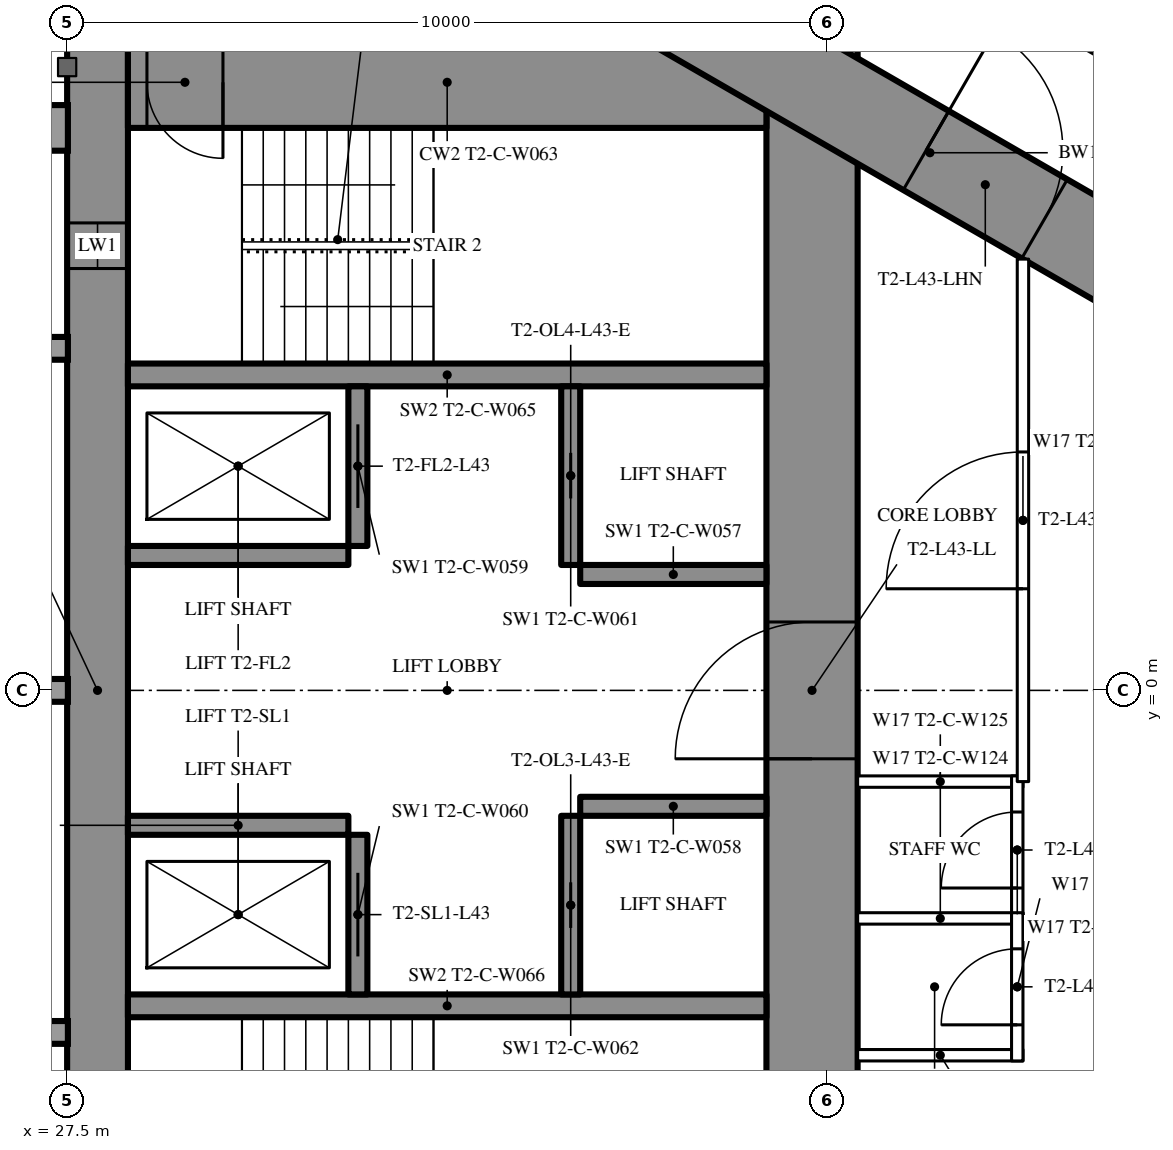
"""IFC4 building model, lengths in metres.
Left out: names, types, materials, properties, quantities, classifications, styles, units other than length and angle.
Written with IfcOpenShell. Run it as: python <this file> out.ifc"""

import sys

from ifc_helpers import new_model, si_unit, direction, frame, frame_2d, origin, place, context, subcontext, project, spatial, rectangle, extrude, element, fill, save


model = new_model("IFC4")
c1 = context("Model", 3, precision=1e-05, world=origin(), true_north=direction((0.0, 1.0)))
c2 = subcontext(c1, "Body", "Model", "MODEL_VIEW")
j1 = project(units=[si_unit("LENGTHUNIT", "METRE"), si_unit("PLANEANGLEUNIT", "RADIAN")], contexts=[c1])
p1 = place(None, origin())
s1 = spatial("IfcSite", under=j1, at=p1, CompositionType="ELEMENT")
p2 = place(p1, origin())
s2 = spatial("IfcBuilding", under=s1, at=p2, CompositionType="ELEMENT")
p3 = place(p2, frame((0.0, 0.0, 163.3)))
s3 = spatial("IfcBuildingStorey", under=s2, at=p3, CompositionType="ELEMENT", Elevation=163.3)
p4 = place(p3, frame((27.9, -8.6, 0.0), z_axis=(0.0, 0.0, 1.0), x_axis=(0.0, 1.0, 0.0)))
e1 = element("IfcWall", 1, at=p4, inside=s3, PredefinedType="SHEAR", context=c2, shape_type="SweptSolid", body=[
    extrude(rectangle(XDim=17.2, YDim=0.8, at=frame_2d((8.6, 0.0))), origin(), (0.0, 0.0, 1.0), 3.5),
])
p5 = place(p4, frame((2.45, 0.0, 0.6)))
e2 = element("IfcOpeningElement", 2, at=p5, cuts=e1, PredefinedType="OPENING", context=c2, shape_type="SweptSolid", body=[
    extrude(rectangle(XDim=0.6, YDim=2.1, at=frame_2d((0.3, 1.05))), frame((0.0, 0.41, 0.0), z_axis=(0.0, -1.0, 0.0), x_axis=(1.0, 0.0, 0.0)), (0.0, 0.0, 1.0), 0.82),
])
p6 = place(p4, frame((14.15, 0.0, 0.6)))
e3 = element("IfcOpeningElement", 3, at=p6, cuts=e1, PredefinedType="OPENING", context=c2, shape_type="SweptSolid", body=[
    extrude(rectangle(XDim=0.6, YDim=2.1, at=frame_2d((0.3, 1.05))), frame((0.0, 0.41, 0.0), z_axis=(0.0, -1.0, 0.0), x_axis=(1.0, 0.0, 0.0)), (0.0, 0.0, 1.0), 0.82),
])
p7 = place(p3, frame((37.3, -8.6, 0.0), z_axis=(0.0, 0.0, 1.0), x_axis=(0.0, 1.0, 0.0)))
e4 = element("IfcWall", 4, at=p7, inside=s3, PredefinedType="SHEAR", context=c2, shape_type="SweptSolid", body=[
    extrude(rectangle(XDim=17.2, YDim=1.2, at=frame_2d((8.6, 0.0))), origin(), (0.0, 0.0, 1.0), 3.5),
])
p8 = place(p7, frame((7.7, 0.0, 0.0)))
e5 = element("IfcOpeningElement", 5, at=p8, cuts=e4, PredefinedType="OPENING", context=c2, shape_type="SweptSolid", body=[
    extrude(rectangle(XDim=1.8, YDim=2.2, at=frame_2d((0.9, 1.1))), frame((0.0, 0.61, 0.0), z_axis=(0.0, -1.0, 0.0), x_axis=(1.0, 0.0, 0.0)), (0.0, 0.0, 1.0), 1.22),
])
p9 = place(p3, frame((28.3, 8.0, 0.0), z_axis=(0.0, 0.0, 1.0), x_axis=(1.0, 0.0, 0.0)))
e6 = element("IfcWall", 6, at=p9, inside=s3, PredefinedType="SHEAR", context=c2, shape_type="SweptSolid", body=[
    extrude(rectangle(XDim=8.4, YDim=1.2, at=frame_2d((4.2, 0.0))), origin(), (0.0, 0.0, 1.0), 3.5),
])
p10 = place(p9, frame((0.25, 0.0, 0.0)))
e7 = element("IfcOpeningElement", 7, at=p10, cuts=e6, PredefinedType="OPENING", context=c2, shape_type="SweptSolid", body=[
    extrude(rectangle(XDim=1.0, YDim=2.2, at=frame_2d((0.5, 1.1))), frame((0.0, 0.61, 0.0), z_axis=(0.0, -1.0, 0.0), x_axis=(1.0, 0.0, 0.0)), (0.0, 0.0, 1.0), 1.22),
])
for number, where, z_axis, x_axis in (
    (8, (28.3, -4.15, 0.0), (0.0, 0.0, 1.0), (1.0, 0.0, 0.0)),
    (9, (28.3, 4.15, 0.0), (0.0, 0.0, 1.0), (1.0, 0.0, 0.0)),
):
    element("IfcWall", number, at=place(p3, frame(where, z_axis=z_axis, x_axis=x_axis)), inside=s3, PredefinedType="SHEAR", context=c2, shape_type="SweptSolid", body=[
        extrude(rectangle(XDim=8.4, YDim=0.3, at=frame_2d((4.2, 0.0))), origin(), (0.0, 0.0, 1.0), 3.5),
    ])
p11 = place(p3, frame((31.325, -4.0, 0.0), z_axis=(0.0, 0.0, 1.0), x_axis=(0.0, 1.0, 0.0)))
e10 = element("IfcWall", 10, at=p11, inside=s3, PredefinedType="SHEAR", context=c2, shape_type="SweptSolid", body=[
    extrude(rectangle(XDim=2.1, YDim=0.25, at=frame_2d((1.05, 0.0))), origin(), (0.0, 0.0, 1.0), 3.5),
])
p12 = place(p11, frame((0.5, 0.0, 0.0)))
e11 = element("IfcOpeningElement", 11, at=p12, cuts=e10, PredefinedType="OPENING", context=c2, shape_type="SweptSolid", body=[
    extrude(rectangle(XDim=1.1, YDim=2.2, at=frame_2d((0.55, 1.1))), frame((0.0, 0.135, 0.0), z_axis=(0.0, -1.0, 0.0), x_axis=(1.0, 0.0, 0.0)), (0.0, 0.0, 1.0), 0.27),
])
p13 = place(p3, frame((34.125, -4.0, 0.0), z_axis=(0.0, 0.0, 1.0), x_axis=(0.0, 1.0, 0.0)))
e12 = element("IfcWall", 12, at=p13, inside=s3, PredefinedType="SHEAR", context=c2, shape_type="SweptSolid", body=[
    extrude(rectangle(XDim=2.35, YDim=0.25, at=frame_2d((1.175, 0.0))), origin(), (0.0, 0.0, 1.0), 3.5),
])
p14 = place(p13, frame((0.875, 0.0, 0.0)))
e13 = element("IfcOpeningElement", 13, at=p14, cuts=e12, PredefinedType="OPENING", context=c2, shape_type="SweptSolid", body=[
    extrude(rectangle(XDim=0.6, YDim=2.0, at=frame_2d((0.3, 1.0))), frame((0.0, 0.135, 0.0), z_axis=(0.0, -1.0, 0.0), x_axis=(1.0, 0.0, 0.0)), (0.0, 0.0, 1.0), 0.27),
])
p15 = place(p3, frame((28.3, -1.775, 0.0), z_axis=(0.0, 0.0, 1.0), x_axis=(1.0, 0.0, 0.0)))
e14 = element("IfcWall", 14, at=p15, inside=s3, PredefinedType="SHEAR", context=c2, shape_type="SweptSolid", body=[
    extrude(rectangle(XDim=2.9, YDim=0.25, at=frame_2d((1.45, 0.0))), origin(), (0.0, 0.0, 1.0), 3.5),
])
p16 = place(p3, frame((34.25, -1.525, 0.0), z_axis=(0.0, 0.0, 1.0), x_axis=(1.0, 0.0, 0.0)))
e15 = element("IfcWall", 15, at=p16, inside=s3, PredefinedType="SHEAR", context=c2, shape_type="SweptSolid", body=[
    extrude(rectangle(XDim=2.45, YDim=0.25, at=frame_2d((1.225, 0.0))), origin(), (0.0, 0.0, 1.0), 3.5),
])
p17 = place(p3, frame((31.325, 1.9, 0.0), z_axis=(0.0, 0.0, 1.0), x_axis=(0.0, 1.0, 0.0)))
e16 = element("IfcWall", 16, at=p17, inside=s3, PredefinedType="SHEAR", context=c2, shape_type="SweptSolid", body=[
    extrude(rectangle(XDim=2.1, YDim=0.25, at=frame_2d((1.05, 0.0))), origin(), (0.0, 0.0, 1.0), 3.5),
])
p18 = place(p17, frame((0.5, 0.0, 0.0)))
e17 = element("IfcOpeningElement", 17, at=p18, cuts=e16, PredefinedType="OPENING", context=c2, shape_type="SweptSolid", body=[
    extrude(rectangle(XDim=1.1, YDim=2.2, at=frame_2d((0.55, 1.1))), frame((0.0, 0.135, 0.0), z_axis=(0.0, -1.0, 0.0), x_axis=(1.0, 0.0, 0.0)), (0.0, 0.0, 1.0), 0.27),
])
p19 = place(p3, frame((34.125, 1.65, 0.0), z_axis=(0.0, 0.0, 1.0), x_axis=(0.0, 1.0, 0.0)))
e18 = element("IfcWall", 18, at=p19, inside=s3, PredefinedType="SHEAR", context=c2, shape_type="SweptSolid", body=[
    extrude(rectangle(XDim=2.35, YDim=0.25, at=frame_2d((1.175, 0.0))), origin(), (0.0, 0.0, 1.0), 3.5),
])
p20 = place(p19, frame((0.875, 0.0, 0.0)))
e19 = element("IfcOpeningElement", 19, at=p20, cuts=e18, PredefinedType="OPENING", context=c2, shape_type="SweptSolid", body=[
    extrude(rectangle(XDim=0.6, YDim=2.0, at=frame_2d((0.3, 1.0))), frame((0.0, 0.135, 0.0), z_axis=(0.0, -1.0, 0.0), x_axis=(1.0, 0.0, 0.0)), (0.0, 0.0, 1.0), 0.27),
])
p21 = place(p3, frame((28.3, 1.775, 0.0), z_axis=(0.0, 0.0, 1.0), x_axis=(1.0, 0.0, 0.0)))
e20 = element("IfcWall", 20, at=p21, inside=s3, PredefinedType="SHEAR", context=c2, shape_type="SweptSolid", body=[
    extrude(rectangle(XDim=2.9, YDim=0.25, at=frame_2d((1.45, 0.0))), origin(), (0.0, 0.0, 1.0), 3.5),
])
p22 = place(p3, frame((34.25, 1.525, 0.0), z_axis=(0.0, 0.0, 1.0), x_axis=(1.0, 0.0, 0.0)))
e21 = element("IfcWall", 21, at=p22, inside=s3, PredefinedType="SHEAR", context=c2, shape_type="SweptSolid", body=[
    extrude(rectangle(XDim=2.45, YDim=0.25, at=frame_2d((1.225, 0.0))), origin(), (0.0, 0.0, 1.0), 3.5),
])
p23 = place(p3, frame((27.2, -13.8, 0.0), z_axis=(0.0, 0.0, 1.0), x_axis=(0.866027159892, 0.499996958321, 0.0)))
e22 = element("IfcWall", 22, at=p23, inside=s3, PredefinedType="SHEAR", context=c2, shape_type="SweptSolid", body=[
    extrude(rectangle(XDim=27.947, YDim=1.2, at=frame_2d((13.973, 0.0))), origin(), (0.0, 0.0, 1.0), 3.5),
])
p24 = place(p23, frame((4.6, 0.0, 0.0)))
e23 = element("IfcOpeningElement", 23, at=p24, cuts=e22, PredefinedType="OPENING", context=c2, shape_type="SweptSolid", body=[
    extrude(rectangle(XDim=1.0, YDim=2.2, at=frame_2d((0.5, 1.1))), frame((0.0, 0.61, 0.0), z_axis=(0.0, -1.0, 0.0), x_axis=(1.0, 0.0, 0.0)), (0.0, 0.0, 1.0), 1.22),
])
p25 = place(p23, frame((13.395, 0.0, 0.0)))
e24 = element("IfcOpeningElement", 24, at=p25, cuts=e22, PredefinedType="OPENING", context=c2, shape_type="SweptSolid", body=[
    extrude(rectangle(XDim=1.8, YDim=2.2, at=frame_2d((0.9, 1.1))), frame((0.0, 0.61, 0.0), z_axis=(0.0, -1.0, 0.0), x_axis=(1.0, 0.0, 0.0)), (0.0, 0.0, 1.0), 1.22),
])
p26 = place(p3, frame((27.2, 13.8, 0.0), z_axis=(0.0, 0.0, 1.0), x_axis=(0.866024515034, -0.500001539357, 0.0)))
e25 = element("IfcWall", 25, at=p26, inside=s3, PredefinedType="SHEAR", context=c2, shape_type="SweptSolid", body=[
    extrude(rectangle(XDim=26.907, YDim=1.2, at=frame_2d((13.454, 0.0))), origin(), (0.0, 0.0, 1.0), 3.5),
])
p27 = place(p26, frame((4.6, 0.0, 0.0)))
e26 = element("IfcOpeningElement", 26, at=p27, cuts=e25, PredefinedType="OPENING", context=c2, shape_type="SweptSolid", body=[
    extrude(rectangle(XDim=1.0, YDim=2.2, at=frame_2d((0.5, 1.1))), frame((0.0, 0.61, 0.0), z_axis=(0.0, -1.0, 0.0), x_axis=(1.0, 0.0, 0.0)), (0.0, 0.0, 1.0), 1.22),
])
p28 = place(p26, frame((13.395, 0.0, 0.0)))
e27 = element("IfcOpeningElement", 27, at=p28, cuts=e25, PredefinedType="OPENING", context=c2, shape_type="SweptSolid", body=[
    extrude(rectangle(XDim=1.8, YDim=2.2, at=frame_2d((0.9, 1.1))), frame((0.0, 0.61, 0.0), z_axis=(0.0, -1.0, 0.0), x_axis=(1.0, 0.0, 0.0)), (0.0, 0.0, 1.0), 1.22),
])
p29 = place(p3, frame((27.959, 16.017, 0.0), z_axis=(0.0, 0.0, 1.0), x_axis=(0.866027146794, -0.499996981007, 0.0)))
e28 = element("IfcWall", 28, at=p29, inside=s3, PredefinedType="PARTITIONING", context=c2, shape_type="SweptSolid", body=[
    extrude(rectangle(XDim=21.657, YDim=0.2, at=frame_2d((10.829, 0.0))), origin(), (0.0, 0.0, 1.0), 3.25),
])
p30 = place(p29, frame((15.391, 0.0, 0.0)))
e29 = element("IfcOpeningElement", 29, at=p30, cuts=e28, PredefinedType="OPENING", context=c2, shape_type="SweptSolid", body=[
    extrude(rectangle(XDim=0.95, YDim=2.2, at=frame_2d((0.475, 1.1))), frame((0.0, 0.11, 0.0), z_axis=(0.0, -1.0, 0.0), x_axis=(1.0, 0.0, 0.0)), (0.0, 0.0, 1.0), 0.22),
])
p31 = place(p29, frame((13.409, 0.0, 0.0)))
e30 = element("IfcOpeningElement", 30, at=p31, cuts=e28, PredefinedType="OPENING", context=c2, shape_type="SweptSolid", body=[
    extrude(rectangle(XDim=0.95, YDim=2.2, at=frame_2d((0.475, 1.1))), frame((0.0, 0.11, 0.0), z_axis=(0.0, -1.0, 0.0), x_axis=(1.0, 0.0, 0.0)), (0.0, 0.0, 1.0), 0.22),
])
p32 = place(p29, frame((0.6, 0.0, 0.0)))
e31 = element("IfcOpeningElement", 31, at=p32, cuts=e28, PredefinedType="OPENING", context=c2, shape_type="SweptSolid", body=[
    extrude(rectangle(XDim=0.95, YDim=2.2, at=frame_2d((0.475, 1.1))), frame((0.0, 0.11, 0.0), z_axis=(0.0, -1.0, 0.0), x_axis=(1.0, 0.0, 0.0)), (0.0, 0.0, 1.0), 0.22),
])
p33 = place(p29, frame((19.349, 0.0, 0.0)))
e32 = element("IfcOpeningElement", 32, at=p33, cuts=e28, PredefinedType="OPENING", context=c2, shape_type="SweptSolid", body=[
    extrude(rectangle(XDim=1.8, YDim=2.2, at=frame_2d((0.9, 1.1))), frame((0.0, 0.11, 0.0), z_axis=(0.0, -1.0, 0.0), x_axis=(1.0, 0.0, 0.0)), (0.0, 0.0, 1.0), 0.22),
])
p34 = place(p3, frame((40.741, -8.638, 0.0), z_axis=(0.0, 0.0, 1.0), x_axis=(0.866022967338, 0.500004220025, 0.0)))
e33 = element("IfcWall", 33, at=p34, inside=s3, PredefinedType="PARTITIONING", context=c2, shape_type="SweptSolid", body=[
    extrude(rectangle(XDim=17.276, YDim=0.2, at=frame_2d((8.638, 0.0))), origin(), (0.0, 0.0, 1.0), 3.25),
])
p35 = place(p34, frame((7.316, 0.0, 0.0)))
e34 = element("IfcOpeningElement", 34, at=p35, cuts=e33, PredefinedType="OPENING", context=c2, shape_type="SweptSolid", body=[
    extrude(rectangle(XDim=0.95, YDim=2.2, at=frame_2d((0.475, 1.1))), frame((0.0, 0.11, 0.0), z_axis=(0.0, -1.0, 0.0), x_axis=(1.0, 0.0, 0.0)), (0.0, 0.0, 1.0), 0.22),
])
p36 = place(p34, frame((11.366, 0.0, 0.0)))
e35 = element("IfcOpeningElement", 35, at=p36, cuts=e33, PredefinedType="OPENING", context=c2, shape_type="SweptSolid", body=[
    extrude(rectangle(XDim=0.95, YDim=2.2, at=frame_2d((0.475, 1.1))), frame((0.0, 0.11, 0.0), z_axis=(0.0, -1.0, 0.0), x_axis=(1.0, 0.0, 0.0)), (0.0, 0.0, 1.0), 0.22),
])
p37 = place(p34, frame((13.347, 0.0, 0.0)))
e36 = element("IfcOpeningElement", 36, at=p37, cuts=e33, PredefinedType="OPENING", context=c2, shape_type="SweptSolid", body=[
    extrude(rectangle(XDim=0.95, YDim=2.2, at=frame_2d((0.475, 1.1))), frame((0.0, 0.11, 0.0), z_axis=(0.0, -1.0, 0.0), x_axis=(1.0, 0.0, 0.0)), (0.0, 0.0, 1.0), 0.22),
])
for number, where, z_axis, x_axis in (
    (37, (37.9, -1.2, 0.0), (0.0, 0.0, 1.0), (1.0, 0.0, 0.0)),
    (38, (37.9, -3.0, 0.0), (0.0, 0.0, 1.0), (1.0, 0.0, 0.0)),
    (39, (37.9, -4.8, 0.0), (0.0, 0.0, 1.0), (1.0, 0.0, 0.0)),
):
    element("IfcWall", number, at=place(p3, frame(where, z_axis=z_axis, x_axis=x_axis)), inside=s3, PredefinedType="PARTITIONING", context=c2, shape_type="SweptSolid", body=[
        extrude(rectangle(XDim=2.175, YDim=0.15, at=frame_2d((1.087, 0.0))), origin(), (0.0, 0.0, 1.0), 3.25),
    ])
p38 = place(p3, frame((40.0, -3.075, 0.0), z_axis=(0.0, 0.0, 1.0), x_axis=(0.0, 1.0, 0.0)))
e40 = element("IfcWall", 40, at=p38, inside=s3, PredefinedType="PARTITIONING", context=c2, shape_type="SweptSolid", body=[
    extrude(rectangle(XDim=1.95, YDim=0.15, at=frame_2d((0.975, 0.0))), origin(), (0.0, 0.0, 1.0), 3.25),
])
p39 = place(p38, frame((0.475, 0.0, 0.0)))
e41 = element("IfcOpeningElement", 41, at=p39, cuts=e40, PredefinedType="OPENING", context=c2, shape_type="SweptSolid", body=[
    extrude(rectangle(XDim=1.0, YDim=2.2, at=frame_2d((0.5, 1.1))), frame((0.0, 0.085, 0.0), z_axis=(0.0, -1.0, 0.0), x_axis=(1.0, 0.0, 0.0)), (0.0, 0.0, 1.0), 0.17),
])
p40 = place(p3, frame((40.0, -4.875, 0.0), z_axis=(0.0, 0.0, 1.0), x_axis=(0.0, 1.0, 0.0)))
e42 = element("IfcWall", 42, at=p40, inside=s3, PredefinedType="PARTITIONING", context=c2, shape_type="SweptSolid", body=[
    extrude(rectangle(XDim=1.95, YDim=0.15, at=frame_2d((0.975, 0.0))), origin(), (0.0, 0.0, 1.0), 3.25),
])
p41 = place(p40, frame((0.475, 0.0, 0.0)))
e43 = element("IfcOpeningElement", 43, at=p41, cuts=e42, PredefinedType="OPENING", context=c2, shape_type="SweptSolid", body=[
    extrude(rectangle(XDim=1.0, YDim=2.2, at=frame_2d((0.5, 1.1))), frame((0.0, 0.085, 0.0), z_axis=(0.0, -1.0, 0.0), x_axis=(1.0, 0.0, 0.0)), (0.0, 0.0, 1.0), 0.17),
])
p42 = place(p3, frame((40.075, -1.2, 0.0), z_axis=(0.0, 0.0, 1.0), x_axis=(0.0, 1.0, 0.0)))
e44 = element("IfcWall", 44, at=p42, inside=s3, PredefinedType="PARTITIONING", context=c2, shape_type="SweptSolid", body=[
    extrude(rectangle(XDim=6.874, YDim=0.15, at=frame_2d((3.437, 0.0))), origin(), (0.0, 0.0, 1.0), 3.25),
])
p43 = place(p42, frame((2.537, 0.0, 0.0)))
e45 = element("IfcOpeningElement", 45, at=p43, cuts=e44, PredefinedType="OPENING", context=c2, shape_type="SweptSolid", body=[
    extrude(rectangle(XDim=1.8, YDim=2.2, at=frame_2d((0.9, 1.1))), frame((0.0, 0.085, 0.0), z_axis=(0.0, -1.0, 0.0), x_axis=(1.0, 0.0, 0.0)), (0.0, 0.0, 1.0), 0.17),
])
p44 = place(p39, origin())
e46 = element("IfcDoor", 46, at=p44, inside=s3, OperationType="SINGLE_SWING_LEFT", PredefinedType="DOOR", context=c2, shape_type="SweptSolid", body=[
    extrude(rectangle(XDim=1.0, YDim=2.2, at=frame_2d((0.5, 1.1))), frame((0.0, 0.025, 0.0), z_axis=(0.0, -1.0, 0.0), x_axis=(1.0, 0.0, 0.0)), (0.0, 0.0, 1.0), 0.05),
])
fill(e41, e46)
p45 = place(p41, origin())
e47 = element("IfcDoor", 47, at=p45, inside=s3, OperationType="SINGLE_SWING_LEFT", PredefinedType="DOOR", context=c2, shape_type="SweptSolid", body=[
    extrude(rectangle(XDim=1.0, YDim=2.2, at=frame_2d((0.5, 1.1))), frame((0.0, 0.025, 0.0), z_axis=(0.0, -1.0, 0.0), x_axis=(1.0, 0.0, 0.0)), (0.0, 0.0, 1.0), 0.05),
])
fill(e43, e47)
p46 = place(p43, origin())
e48 = element("IfcDoor", 48, at=p46, inside=s3, OperationType="DOUBLE_DOOR_SINGLE_SWING", PredefinedType="DOOR", context=c2, shape_type="SweptSolid", body=[
    extrude(rectangle(XDim=1.8, YDim=2.2, at=frame_2d((0.9, 1.1))), frame((0.0, 0.025, 0.0), z_axis=(0.0, -1.0, 0.0), x_axis=(1.0, 0.0, 0.0)), (0.0, 0.0, 1.0), 0.05),
])
fill(e45, e48)
p47 = place(p28, origin())
e49 = element("IfcDoor", 49, at=p47, inside=s3, OperationType="DOUBLE_DOOR_SINGLE_SWING", PredefinedType="DOOR", context=c2, shape_type="SweptSolid", body=[
    extrude(rectangle(XDim=1.8, YDim=2.2, at=frame_2d((0.9, 1.1))), frame((0.0, 0.025, 0.0), z_axis=(0.0, -1.0, 0.0), x_axis=(1.0, 0.0, 0.0)), (0.0, 0.0, 1.0), 0.05),
])
fill(e27, e49)
p48 = place(p8, origin())
e50 = element("IfcDoor", 50, at=p48, inside=s3, OperationType="DOUBLE_DOOR_SINGLE_SWING", PredefinedType="DOOR", context=c2, shape_type="SweptSolid", body=[
    extrude(rectangle(XDim=1.8, YDim=2.2, at=frame_2d((0.9, 1.1))), frame((0.0, 0.025, 0.0), z_axis=(0.0, -1.0, 0.0), x_axis=(1.0, 0.0, 0.0)), (0.0, 0.0, 1.0), 0.05),
])
fill(e5, e50)
p49 = place(p10, origin())
e51 = element("IfcDoor", 51, at=p49, inside=s3, OperationType="SINGLE_SWING_RIGHT", PredefinedType="DOOR", context=c2, shape_type="SweptSolid", body=[
    extrude(rectangle(XDim=1.0, YDim=2.2, at=frame_2d((0.5, 1.1))), frame((0.0, 0.025, 0.0), z_axis=(0.0, -1.0, 0.0), x_axis=(1.0, 0.0, 0.0)), (0.0, 0.0, 1.0), 0.05),
])
fill(e7, e51)
p50 = place(p12, origin())
e52 = element("IfcDoor", 52, at=p50, inside=s3, OperationType="SLIDING_TO_LEFT", PredefinedType="USERDEFINED", context=c2, shape_type="SweptSolid", body=[
    extrude(rectangle(XDim=1.1, YDim=2.2, at=frame_2d((0.55, 1.1))), frame((0.0, 0.025, 0.0), z_axis=(0.0, -1.0, 0.0), x_axis=(1.0, 0.0, 0.0)), (0.0, 0.0, 1.0), 0.05),
])
fill(e11, e52)
p51 = place(p18, origin())
e53 = element("IfcDoor", 53, at=p51, inside=s3, OperationType="SLIDING_TO_LEFT", PredefinedType="USERDEFINED", context=c2, shape_type="SweptSolid", body=[
    extrude(rectangle(XDim=1.1, YDim=2.2, at=frame_2d((0.55, 1.1))), frame((0.0, 0.025, 0.0), z_axis=(0.0, -1.0, 0.0), x_axis=(1.0, 0.0, 0.0)), (0.0, 0.0, 1.0), 0.05),
])
fill(e17, e53)
p52 = place(p14, origin())
e54 = element("IfcDoor", 54, at=p52, inside=s3, OperationType="SLIDING_TO_LEFT", PredefinedType="DOOR", context=c2, shape_type="SweptSolid", body=[
    extrude(rectangle(XDim=0.6, YDim=2.0, at=frame_2d((0.3, 1.0))), frame((0.0, 0.025, 0.0), z_axis=(0.0, -1.0, 0.0), x_axis=(1.0, 0.0, 0.0)), (0.0, 0.0, 1.0), 0.05),
])
fill(e13, e54)
p53 = place(p20, origin())
e55 = element("IfcDoor", 55, at=p53, inside=s3, OperationType="SLIDING_TO_LEFT", PredefinedType="DOOR", context=c2, shape_type="SweptSolid", body=[
    extrude(rectangle(XDim=0.6, YDim=2.0, at=frame_2d((0.3, 1.0))), frame((0.0, 0.025, 0.0), z_axis=(0.0, -1.0, 0.0), x_axis=(1.0, 0.0, 0.0)), (0.0, 0.0, 1.0), 0.05),
])
fill(e19, e55)
p54 = place(p6, origin())
e56 = element("IfcWindow", 56, at=p54, inside=s3, PartitioningType="SINGLE_PANEL", PredefinedType="WINDOW", context=c2, shape_type="SweptSolid", body=[
    extrude(rectangle(XDim=0.6, YDim=2.1, at=frame_2d((0.3, 1.05))), frame((0.0, 0.03, 0.0), z_axis=(0.0, -1.0, 0.0), x_axis=(1.0, 0.0, 0.0)), (0.0, 0.0, 1.0), 0.06),
])
fill(e3, e56)
save(model, sys.argv[1])
